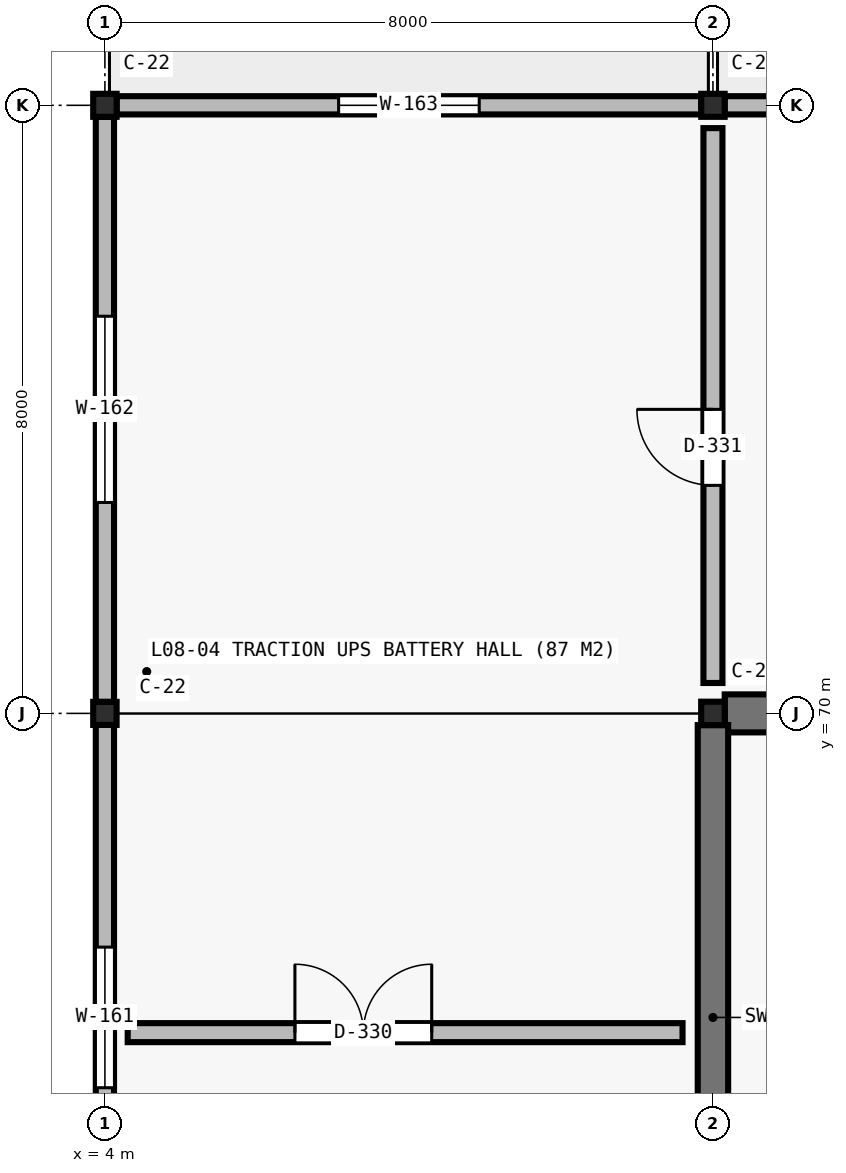
"""IFC4 building model, lengths in metres.
Left out: names, types, materials, properties, quantities, classifications, styles, units other than length and angle.
Written with IfcOpenShell. Run it as: python <this file> out.ifc"""

import sys

from ifc_helpers import new_model, si_unit, direction, frame, frame_2d, origin, origin_2d, place, context, subcontext, project, spatial, rectangle, i_section, extrude, element, fill, save


model = new_model("IFC4")
c1 = context("Model", 3, precision=1e-05, world=origin(), true_north=direction((0.0, 1.0)))
c2 = subcontext(c1, "Body", "Model", "MODEL_VIEW")
j1 = project(units=[si_unit("LENGTHUNIT", "METRE"), si_unit("PLANEANGLEUNIT", "RADIAN")], contexts=[c1])
p1 = place(None, origin())
s1 = spatial("IfcSite", under=j1, at=p1, CompositionType="ELEMENT")
p2 = place(p1, origin())
s2 = spatial("IfcBuilding", under=s1, at=p2, CompositionType="ELEMENT")
p3 = place(p2, frame((0.0, 0.0, 36.4)))
s3 = spatial("IfcBuildingStorey", under=s2, at=p3, CompositionType="ELEMENT", Elevation=36.4)
for number, where, z_axis, x_axis in (
    (1, (4.0, 70.0, 0.0), (0.0, 0.0, 1.0), (1.0, 0.0, 0.0)),
    (2, (4.0, 78.0, 0.0), (0.0, 0.0, 1.0), (1.0, 0.0, 0.0)),
):
    element("IfcColumn", number, at=place(p3, frame(where, z_axis=z_axis, x_axis=x_axis)), inside=s3, PredefinedType="COLUMN", context=c2, shape_type="SweptSolid", body=[
        extrude(i_section(OverallWidth=0.308, OverallDepth=0.303, WebThickness=0.013, FlangeThickness=0.013, at=origin_2d()), origin(), (0.0, 0.0, 1.0), 3.98),
    ])
p4 = place(p3, frame((12.0, 70.0, 0.0), z_axis=(0.0, 0.0, 1.0), x_axis=(1.0, 0.0, 0.0)))
e3 = element("IfcColumn", 3, at=p4, inside=s3, PredefinedType="COLUMN", context=c2, shape_type="SweptSolid", body=[
    extrude(i_section(OverallWidth=0.31, OverallDepth=0.308, WebThickness=0.015, FlangeThickness=0.015, at=origin_2d()), origin(), (0.0, 0.0, 1.0), 3.98),
])
p5 = place(p3, frame((12.0, 78.0, 0.0), z_axis=(0.0, 0.0, 1.0), x_axis=(1.0, 0.0, 0.0)))
e4 = element("IfcColumn", 4, at=p5, inside=s3, PredefinedType="COLUMN", context=c2, shape_type="SweptSolid", body=[
    extrude(i_section(OverallWidth=0.308, OverallDepth=0.303, WebThickness=0.013, FlangeThickness=0.013, at=origin_2d()), origin(), (0.0, 0.0, 1.0), 3.98),
])
p6 = place(p3, frame((12.155, 70.0, 0.0), z_axis=(0.0, 0.0, 1.0), x_axis=(1.0, 0.0, 0.0)))
e5 = element("IfcWall", 5, at=p6, inside=s3, PredefinedType="SHEAR", context=c2, shape_type="SweptSolid", body=[
    extrude(rectangle(XDim=7.845, YDim=0.5, at=frame_2d((3.922, 0.0))), origin(), (0.0, 0.0, 1.0), 3.98),
])
p7 = place(p3, frame((12.0, 62.154, 0.0), z_axis=(0.0, 0.0, 1.0), x_axis=(0.0, 1.0, 0.0)))
e6 = element("IfcWall", 6, at=p7, inside=s3, PredefinedType="SHEAR", context=c2, shape_type="SweptSolid", body=[
    extrude(rectangle(XDim=7.692, YDim=0.4, at=frame_2d((3.846, 0.0))), origin(), (0.0, 0.0, 1.0), 3.98),
])
p8 = place(p7, frame((0.746, 0.0, 0.0)))
e7 = element("IfcOpeningElement", 7, at=p8, cuts=e6, PredefinedType="OPENING", context=c2, shape_type="SweptSolid", body=[
    extrude(rectangle(XDim=1.8, YDim=2.2, at=frame_2d((0.9, 1.1))), frame((0.0, 0.21, 0.0), z_axis=(0.0, -1.0, 0.0), x_axis=(1.0, 0.0, 0.0)), (0.0, 0.0, 1.0), 0.42),
])
p9 = place(p3, frame((4.0, 62.152, 0.0), z_axis=(0.0, 0.0, 1.0), x_axis=(0.0, 1.0, 0.0)))
e8 = element("IfcWall", 8, at=p9, inside=s3, PredefinedType="STANDARD", context=c2, shape_type="SweptSolid", body=[
    extrude(rectangle(XDim=7.697, YDim=0.24, at=frame_2d((3.848, 0.0))), origin(), (0.0, 0.0, 1.0), 3.573),
])
p10 = place(p9, frame((2.924, 0.0, 0.95)))
e9 = element("IfcOpeningElement", 9, at=p10, cuts=e8, PredefinedType="OPENING", context=c2, shape_type="SweptSolid", body=[
    extrude(rectangle(XDim=1.85, YDim=1.25, at=frame_2d((0.925, 0.625))), frame((0.0, 0.13, 0.0), z_axis=(0.0, -1.0, 0.0), x_axis=(1.0, 0.0, 0.0)), (0.0, 0.0, 1.0), 0.26),
])
p11 = place(p3, frame((4.0, 70.152, 0.0), z_axis=(0.0, 0.0, 1.0), x_axis=(0.0, 1.0, 0.0)))
e10 = element("IfcWall", 10, at=p11, inside=s3, PredefinedType="STANDARD", context=c2, shape_type="SweptSolid", body=[
    extrude(rectangle(XDim=7.697, YDim=0.24, at=frame_2d((3.848, 0.0))), origin(), (0.0, 0.0, 1.0), 3.573),
])
p12 = place(p11, frame((2.624, 0.0, 0.95)))
e11 = element("IfcOpeningElement", 11, at=p12, cuts=e10, PredefinedType="OPENING", context=c2, shape_type="SweptSolid", body=[
    extrude(rectangle(XDim=2.45, YDim=1.35, at=frame_2d((1.225, 0.675))), frame((0.0, 0.13, 0.0), z_axis=(0.0, -1.0, 0.0), x_axis=(1.0, 0.0, 0.0)), (0.0, 0.0, 1.0), 0.26),
])
p13 = place(p3, frame((4.154, 78.0, 0.0), z_axis=(0.0, 0.0, 1.0), x_axis=(1.0, 0.0, 0.0)))
e12 = element("IfcWall", 12, at=p13, inside=s3, PredefinedType="STANDARD", context=c2, shape_type="SweptSolid", body=[
    extrude(rectangle(XDim=7.692, YDim=0.24, at=frame_2d((3.846, 0.0))), origin(), (0.0, 0.0, 1.0), 3.573),
])
p14 = place(p13, frame((2.921, 0.0, 0.95)))
e13 = element("IfcOpeningElement", 13, at=p14, cuts=e12, PredefinedType="OPENING", context=c2, shape_type="SweptSolid", body=[
    extrude(rectangle(XDim=1.85, YDim=1.25, at=frame_2d((0.925, 0.625))), frame((0.0, 0.13, 0.0), z_axis=(0.0, -1.0, 0.0), x_axis=(1.0, 0.0, 0.0)), (0.0, 0.0, 1.0), 0.26),
])
p15 = place(p3, frame((12.154, 78.0, 0.0), z_axis=(0.0, 0.0, 1.0), x_axis=(1.0, 0.0, 0.0)))
e14 = element("IfcWall", 14, at=p15, inside=s3, PredefinedType="STANDARD", context=c2, shape_type="SweptSolid", body=[
    extrude(rectangle(XDim=7.692, YDim=0.24, at=frame_2d((3.846, 0.0))), origin(), (0.0, 0.0, 1.0), 3.573),
])
p16 = place(p15, frame((2.621, 0.0, 0.95)))
e15 = element("IfcOpeningElement", 15, at=p16, cuts=e14, PredefinedType="OPENING", context=c2, shape_type="SweptSolid", body=[
    extrude(rectangle(XDim=2.45, YDim=1.35, at=frame_2d((1.225, 0.675))), frame((0.0, 0.13, 0.0), z_axis=(0.0, -1.0, 0.0), x_axis=(1.0, 0.0, 0.0)), (0.0, 0.0, 1.0), 0.26),
])
p17 = place(p3, frame((12.15, 77.85, 4.2), z_axis=(0.0, 0.0, 1.0), x_axis=(1.0, 0.0, 0.0)))
e16 = element("IfcWall", 16, at=p17, inside=s3, PredefinedType="PARAPET", context=c2, shape_type="SweptSolid", body=[
    extrude(rectangle(XDim=23.7, YDim=0.29, at=frame_2d((11.85, 0.0))), origin(), (0.0, 0.0, 1.0), 1.15),
])
p18 = place(p3, frame((12.15, 70.15, 4.2), z_axis=(0.0, 0.0, 1.0), x_axis=(0.0, 1.0, 0.0)))
e17 = element("IfcWall", 17, at=p18, inside=s3, PredefinedType="PARAPET", context=c2, shape_type="SweptSolid", body=[
    extrude(rectangle(XDim=7.7, YDim=0.29, at=frame_2d((3.85, 0.0))), origin(), (0.0, 0.0, 1.0), 1.15),
])
p19 = place(p3, frame((12.15, 70.15, 4.2), z_axis=(0.0, 0.0, 1.0), x_axis=(1.0, 0.0, 0.0)))
e18 = element("IfcWall", 18, at=p19, inside=s3, PredefinedType="PARAPET", context=c2, shape_type="SweptSolid", body=[
    extrude(rectangle(XDim=23.7, YDim=0.29, at=frame_2d((11.85, 0.0))), origin(), (0.0, 0.0, 1.0), 1.15),
])
p20 = place(p3, frame((4.3, 65.8, 0.0), z_axis=(0.0, 0.0, 1.0), x_axis=(1.0, 0.0, 0.0)))
e19 = element("IfcWall", 19, at=p20, inside=s3, PredefinedType="SOLIDWALL", context=c2, shape_type="SweptSolid", body=[
    extrude(rectangle(XDim=7.3, YDim=0.25, at=frame_2d((3.65, 0.0))), origin(), (0.0, 0.0, 1.0), 3.98),
])
p21 = place(p20, frame((2.2, 0.0, 0.0)))
e20 = element("IfcOpeningElement", 20, at=p21, cuts=e19, PredefinedType="OPENING", context=c2, shape_type="SweptSolid", body=[
    extrude(rectangle(XDim=1.8, YDim=2.2, at=frame_2d((0.9, 1.1))), frame((0.0, 0.135, 0.0), z_axis=(0.0, -1.0, 0.0), x_axis=(1.0, 0.0, 0.0)), (0.0, 0.0, 1.0), 0.27),
])
p22 = place(p3, frame((12.0, 70.4, 0.0), z_axis=(0.0, 0.0, 1.0), x_axis=(0.0, 1.0, 0.0)))
e21 = element("IfcWall", 21, at=p22, inside=s3, PredefinedType="SOLIDWALL", context=c2, shape_type="SweptSolid", body=[
    extrude(rectangle(XDim=7.3, YDim=0.25, at=frame_2d((3.65, 0.0))), origin(), (0.0, 0.0, 1.0), 3.573),
])
p23 = place(p22, frame((2.6, 0.0, 0.0)))
e22 = element("IfcOpeningElement", 22, at=p23, cuts=e21, PredefinedType="OPENING", context=c2, shape_type="SweptSolid", body=[
    extrude(rectangle(XDim=1.0, YDim=2.15, at=frame_2d((0.5, 1.075))), frame((0.0, 0.135, 0.0), z_axis=(0.0, -1.0, 0.0), x_axis=(1.0, 0.0, 0.0)), (0.0, 0.0, 1.0), 0.27),
])
p24 = place(p10, origin())
e23 = element("IfcWindow", 23, at=p24, inside=s3, PartitioningType="SINGLE_PANEL", PredefinedType="WINDOW", context=c2, shape_type="SweptSolid", body=[
    extrude(rectangle(XDim=1.85, YDim=1.25, at=frame_2d((0.925, 0.625))), frame((0.0, 0.03, 0.0), z_axis=(0.0, -1.0, 0.0), x_axis=(1.0, 0.0, 0.0)), (0.0, 0.0, 1.0), 0.06),
])
fill(e9, e23)
p25 = place(p12, origin())
e24 = element("IfcWindow", 24, at=p25, inside=s3, PartitioningType="SINGLE_PANEL", PredefinedType="WINDOW", context=c2, shape_type="SweptSolid", body=[
    extrude(rectangle(XDim=2.45, YDim=1.35, at=frame_2d((1.225, 0.675))), frame((0.0, 0.03, 0.0), z_axis=(0.0, -1.0, 0.0), x_axis=(1.0, 0.0, 0.0)), (0.0, 0.0, 1.0), 0.06),
])
fill(e11, e24)
p26 = place(p14, origin())
e25 = element("IfcWindow", 25, at=p26, inside=s3, PartitioningType="SINGLE_PANEL", PredefinedType="WINDOW", context=c2, shape_type="SweptSolid", body=[
    extrude(rectangle(XDim=1.85, YDim=1.25, at=frame_2d((0.925, 0.625))), frame((0.0, 0.03, 0.0), z_axis=(0.0, -1.0, 0.0), x_axis=(1.0, 0.0, 0.0)), (0.0, 0.0, 1.0), 0.06),
])
fill(e13, e25)
p27 = place(p21, origin())
e26 = element("IfcDoor", 26, at=p27, inside=s3, OperationType="DOUBLE_DOOR_SINGLE_SWING", PredefinedType="DOOR", context=c2, shape_type="SweptSolid", body=[
    extrude(rectangle(XDim=1.8, YDim=2.2, at=frame_2d((0.9, 1.1))), frame((0.0, 0.025, 0.0), z_axis=(0.0, -1.0, 0.0), x_axis=(1.0, 0.0, 0.0)), (0.0, 0.0, 1.0), 0.05),
])
fill(e20, e26)
p28 = place(p23, origin())
e27 = element("IfcDoor", 27, at=p28, inside=s3, OperationType="SINGLE_SWING_RIGHT", PredefinedType="DOOR", context=c2, shape_type="SweptSolid", body=[
    extrude(rectangle(XDim=1.0, YDim=2.15, at=frame_2d((0.5, 1.075))), frame((0.0, 0.025, 0.0), z_axis=(0.0, -1.0, 0.0), x_axis=(1.0, 0.0, 0.0)), (0.0, 0.0, 1.0), 0.05),
])
fill(e22, e27)
save(model, sys.argv[1])
